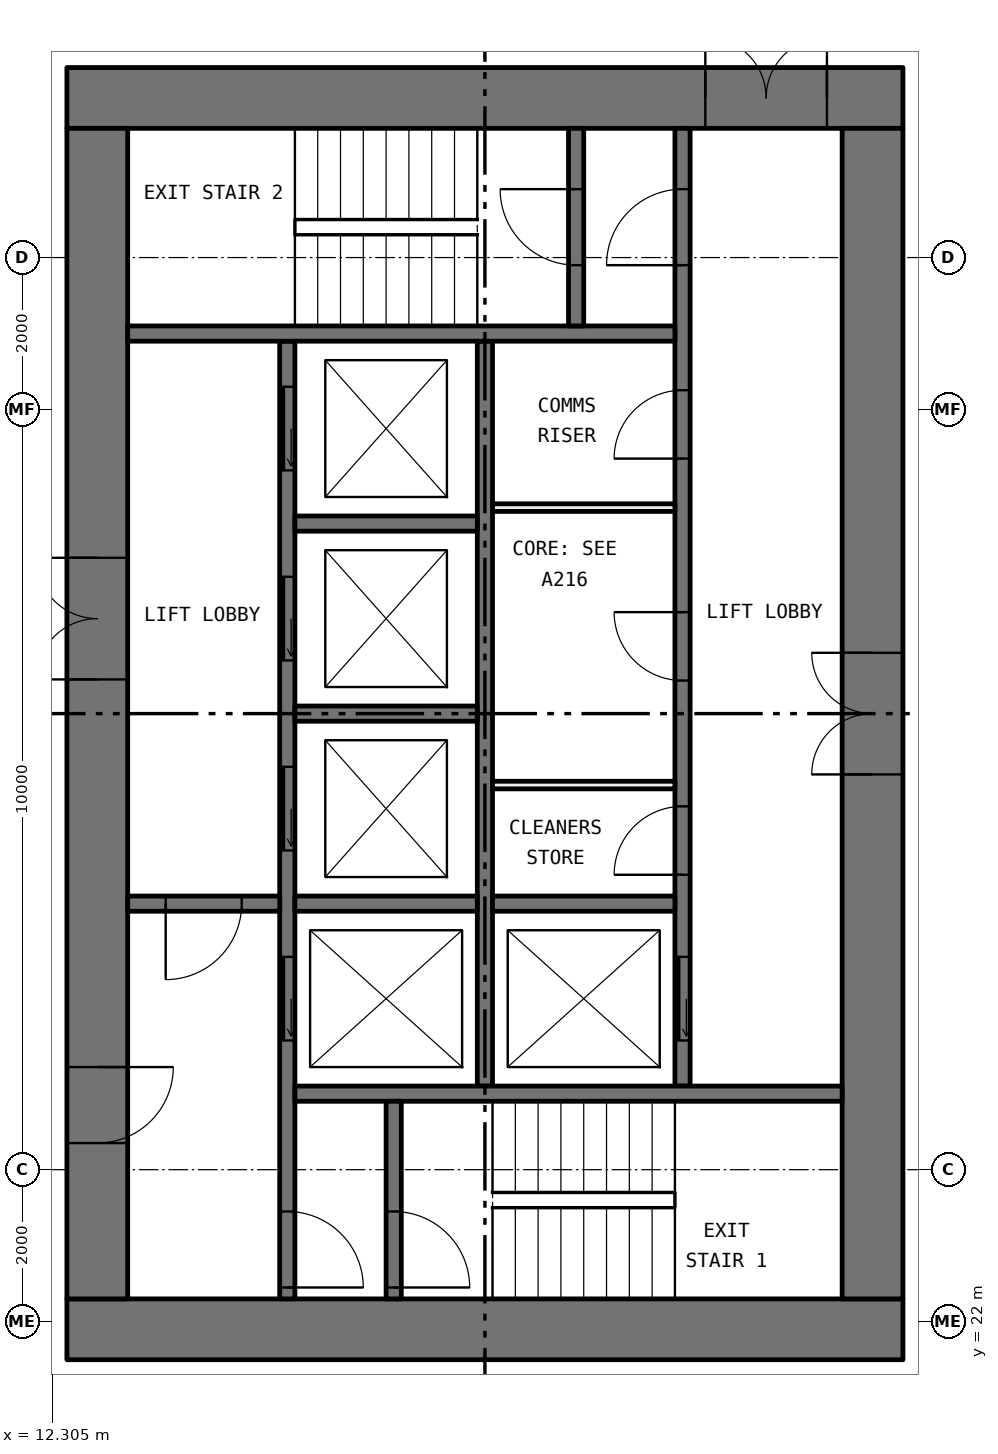
"""IFC4 building model, lengths in metres.
Left out: names, types, materials, properties, quantities, classifications, styles, units other than length and angle.
Written with IfcOpenShell. Run it as: python <this file> out.ifc"""

import sys

from ifc_helpers import new_model, si_unit, direction, frame, frame_2d, origin, place, context, subcontext, project, spatial, rectangle, extrude, element, fill, save


model = new_model("IFC4")
c1 = context("Model", 3, precision=1e-05, world=origin(), true_north=direction((0.0, 1.0)))
c2 = subcontext(c1, "Body", "Model", "MODEL_VIEW")
j1 = project(units=[si_unit("LENGTHUNIT", "METRE"), si_unit("PLANEANGLEUNIT", "RADIAN")], contexts=[c1])
p1 = place(None, origin())
s1 = spatial("IfcSite", under=j1, at=p1, CompositionType="ELEMENT")
p2 = place(p1, origin())
s2 = spatial("IfcBuilding", under=s1, at=p2, CompositionType="ELEMENT")
p3 = place(p2, frame((0.0, 0.0, 64.5)))
s3 = spatial("IfcBuildingStorey", under=s2, at=p3, CompositionType="ELEMENT", Elevation=64.5)
p4 = place(p3, frame((12.5, 21.9, 0.0), z_axis=(0.0, 0.0, 1.0), x_axis=(1.0, 0.0, 0.0)))
e1 = element("IfcWall", 1, at=p4, inside=s3, PredefinedType="SHEAR", context=c2, shape_type="SweptSolid", body=[
    extrude(rectangle(XDim=11.0, YDim=0.8, at=frame_2d((5.5, 0.0))), origin(), (0.0, 0.0, 1.0), 3.05),
])
p5 = place(p3, frame((12.5, 38.1, 0.0), z_axis=(0.0, 0.0, 1.0), x_axis=(1.0, 0.0, 0.0)))
e2 = element("IfcWall", 2, at=p5, inside=s3, PredefinedType="SHEAR", context=c2, shape_type="SweptSolid", body=[
    extrude(rectangle(XDim=11.0, YDim=0.8, at=frame_2d((5.5, 0.0))), origin(), (0.0, 0.0, 1.0), 3.05),
])
p6 = place(p5, frame((8.4, 0.0, 0.0)))
e3 = element("IfcOpeningElement", 3, at=p6, cuts=e2, PredefinedType="OPENING", context=c2, shape_type="SweptSolid", body=[
    extrude(rectangle(XDim=1.6, YDim=2.1, at=frame_2d((0.8, 1.05))), frame((0.0, 0.41, 0.0), z_axis=(0.0, -1.0, 0.0), x_axis=(1.0, 0.0, 0.0)), (0.0, 0.0, 1.0), 0.82),
])
p7 = place(p3, frame((12.9, 22.3, 0.0), z_axis=(0.0, 0.0, 1.0), x_axis=(0.0, 1.0, 0.0)))
e4 = element("IfcWall", 4, at=p7, inside=s3, PredefinedType="SHEAR", context=c2, shape_type="SweptSolid", body=[
    extrude(rectangle(XDim=15.4, YDim=0.8, at=frame_2d((7.7, 0.0))), origin(), (0.0, 0.0, 1.0), 3.05),
])
p8 = place(p7, frame((8.15, 0.0, 0.0)))
e5 = element("IfcOpeningElement", 5, at=p8, cuts=e4, PredefinedType="OPENING", context=c2, shape_type="SweptSolid", body=[
    extrude(rectangle(XDim=1.6, YDim=2.1, at=frame_2d((0.8, 1.05))), frame((0.0, 0.41, 0.0), z_axis=(0.0, -1.0, 0.0), x_axis=(1.0, 0.0, 0.0)), (0.0, 0.0, 1.0), 0.82),
])
p9 = place(p7, frame((2.05, 0.0, 0.0)))
e6 = element("IfcOpeningElement", 6, at=p9, cuts=e4, PredefinedType="OPENING", context=c2, shape_type="SweptSolid", body=[
    extrude(rectangle(XDim=1.0, YDim=2.1, at=frame_2d((0.5, 1.05))), frame((0.0, 0.41, 0.0), z_axis=(0.0, -1.0, 0.0), x_axis=(1.0, 0.0, 0.0)), (0.0, 0.0, 1.0), 0.82),
])
p10 = place(p3, frame((23.1, 22.3, 0.0), z_axis=(0.0, 0.0, 1.0), x_axis=(0.0, 1.0, 0.0)))
e7 = element("IfcWall", 7, at=p10, inside=s3, PredefinedType="SHEAR", context=c2, shape_type="SweptSolid", body=[
    extrude(rectangle(XDim=15.4, YDim=0.8, at=frame_2d((7.7, 0.0))), origin(), (0.0, 0.0, 1.0), 3.05),
])
p11 = place(p10, frame((6.9, 0.0, 0.0)))
e8 = element("IfcOpeningElement", 8, at=p11, cuts=e7, PredefinedType="OPENING", context=c2, shape_type="SweptSolid", body=[
    extrude(rectangle(XDim=1.6, YDim=2.1, at=frame_2d((0.8, 1.05))), frame((0.0, 0.41, 0.0), z_axis=(0.0, -1.0, 0.0), x_axis=(1.0, 0.0, 0.0)), (0.0, 0.0, 1.0), 0.82),
])
p12 = place(p3, frame((15.4, 22.3, 0.0), z_axis=(0.0, 0.0, 1.0), x_axis=(0.0, 1.0, 0.0)))
e9 = element("IfcWall", 9, at=p12, inside=s3, PredefinedType="SOLIDWALL", context=c2, shape_type="SweptSolid", body=[
    extrude(rectangle(XDim=12.6, YDim=0.2, at=frame_2d((6.3, 0.0))), origin(), (0.0, 0.0, 1.0), 3.05),
])
p13 = place(p12, frame((3.4, 0.0, 0.0)))
e10 = element("IfcOpeningElement", 10, at=p13, cuts=e9, PredefinedType="OPENING", context=c2, shape_type="SweptSolid", body=[
    extrude(rectangle(XDim=1.1, YDim=2.1, at=frame_2d((0.55, 1.05))), frame((0.0, 0.11, 0.0), z_axis=(0.0, -1.0, 0.0), x_axis=(1.0, 0.0, 0.0)), (0.0, 0.0, 1.0), 0.22),
])
p14 = place(p12, frame((5.9, 0.0, 0.0)))
e11 = element("IfcOpeningElement", 11, at=p14, cuts=e9, PredefinedType="OPENING", context=c2, shape_type="SweptSolid", body=[
    extrude(rectangle(XDim=1.1, YDim=2.1, at=frame_2d((0.55, 1.05))), frame((0.0, 0.11, 0.0), z_axis=(0.0, -1.0, 0.0), x_axis=(1.0, 0.0, 0.0)), (0.0, 0.0, 1.0), 0.22),
])
p15 = place(p12, frame((8.4, 0.0, 0.0)))
e12 = element("IfcOpeningElement", 12, at=p15, cuts=e9, PredefinedType="OPENING", context=c2, shape_type="SweptSolid", body=[
    extrude(rectangle(XDim=1.1, YDim=2.1, at=frame_2d((0.55, 1.05))), frame((0.0, 0.11, 0.0), z_axis=(0.0, -1.0, 0.0), x_axis=(1.0, 0.0, 0.0)), (0.0, 0.0, 1.0), 0.22),
])
p16 = place(p12, frame((10.9, 0.0, 0.0)))
e13 = element("IfcOpeningElement", 13, at=p16, cuts=e9, PredefinedType="OPENING", context=c2, shape_type="SweptSolid", body=[
    extrude(rectangle(XDim=1.1, YDim=2.1, at=frame_2d((0.55, 1.05))), frame((0.0, 0.11, 0.0), z_axis=(0.0, -1.0, 0.0), x_axis=(1.0, 0.0, 0.0)), (0.0, 0.0, 1.0), 0.22),
])
p17 = place(p12, frame((0.15, 0.0, 0.0)))
e14 = element("IfcOpeningElement", 14, at=p17, cuts=e9, PredefinedType="OPENING", context=c2, shape_type="SweptSolid", body=[
    extrude(rectangle(XDim=1.0, YDim=2.1, at=frame_2d((0.5, 1.05))), frame((0.0, 0.11, 0.0), z_axis=(0.0, -1.0, 0.0), x_axis=(1.0, 0.0, 0.0)), (0.0, 0.0, 1.0), 0.22),
])
p18 = place(p3, frame((20.6, 25.1, 0.0), z_axis=(0.0, 0.0, 1.0), x_axis=(0.0, 1.0, 0.0)))
e15 = element("IfcWall", 15, at=p18, inside=s3, PredefinedType="SOLIDWALL", context=c2, shape_type="SweptSolid", body=[
    extrude(rectangle(XDim=12.6, YDim=0.2, at=frame_2d((6.3, 0.0))), origin(), (0.0, 0.0, 1.0), 3.05),
])
p19 = place(p18, frame((0.6, 0.0, 0.0)))
e16 = element("IfcOpeningElement", 16, at=p19, cuts=e15, PredefinedType="OPENING", context=c2, shape_type="SweptSolid", body=[
    extrude(rectangle(XDim=1.1, YDim=2.1, at=frame_2d((0.55, 1.05))), frame((0.0, 0.11, 0.0), z_axis=(0.0, -1.0, 0.0), x_axis=(1.0, 0.0, 0.0)), (0.0, 0.0, 1.0), 0.22),
])
p20 = place(p18, frame((10.8, 0.0, 0.0)))
e17 = element("IfcOpeningElement", 17, at=p20, cuts=e15, PredefinedType="OPENING", context=c2, shape_type="SweptSolid", body=[
    extrude(rectangle(XDim=1.0, YDim=2.1, at=frame_2d((0.5, 1.05))), frame((0.0, 0.11, 0.0), z_axis=(0.0, -1.0, 0.0), x_axis=(1.0, 0.0, 0.0)), (0.0, 0.0, 1.0), 0.22),
])
p21 = place(p18, frame((2.78, 0.0, 0.0)))
e18 = element("IfcOpeningElement", 18, at=p21, cuts=e15, PredefinedType="OPENING", context=c2, shape_type="SweptSolid", body=[
    extrude(rectangle(XDim=0.9, YDim=2.1, at=frame_2d((0.45, 1.05))), frame((0.0, 0.11, 0.0), z_axis=(0.0, -1.0, 0.0), x_axis=(1.0, 0.0, 0.0)), (0.0, 0.0, 1.0), 0.22),
])
p22 = place(p18, frame((5.335, 0.0, 0.0)))
e19 = element("IfcOpeningElement", 19, at=p22, cuts=e15, PredefinedType="OPENING", context=c2, shape_type="SweptSolid", body=[
    extrude(rectangle(XDim=0.9, YDim=2.1, at=frame_2d((0.45, 1.05))), frame((0.0, 0.11, 0.0), z_axis=(0.0, -1.0, 0.0), x_axis=(1.0, 0.0, 0.0)), (0.0, 0.0, 1.0), 0.22),
])
p23 = place(p18, frame((8.255, 0.0, 0.0)))
e20 = element("IfcOpeningElement", 20, at=p23, cuts=e15, PredefinedType="OPENING", context=c2, shape_type="SweptSolid", body=[
    extrude(rectangle(XDim=0.9, YDim=2.1, at=frame_2d((0.45, 1.05))), frame((0.0, 0.11, 0.0), z_axis=(0.0, -1.0, 0.0), x_axis=(1.0, 0.0, 0.0)), (0.0, 0.0, 1.0), 0.22),
])
p24 = place(p3, frame((18.0, 25.1, 0.0), z_axis=(0.0, 0.0, 1.0), x_axis=(0.0, 1.0, 0.0)))
e21 = element("IfcWall", 21, at=p24, inside=s3, PredefinedType="SOLIDWALL", context=c2, shape_type="SweptSolid", body=[
    extrude(rectangle(XDim=9.8, YDim=0.2, at=frame_2d((4.9, 0.0))), origin(), (0.0, 0.0, 1.0), 3.05),
])
for number, where, z_axis, x_axis in (
    (22, (15.5, 25.0, 0.0), (0.0, 0.0, 1.0), (1.0, 0.0, 0.0)),
    (23, (13.3, 35.0, 0.0), (0.0, 0.0, 1.0), (1.0, 0.0, 0.0)),
):
    element("IfcWall", number, at=place(p3, frame(where, z_axis=z_axis, x_axis=x_axis)), inside=s3, PredefinedType="SOLIDWALL", context=c2, shape_type="SweptSolid", body=[
        extrude(rectangle(XDim=7.2, YDim=0.2, at=frame_2d((3.6, 0.0))), origin(), (0.0, 0.0, 1.0), 3.05),
    ])
p25 = place(p3, frame((13.3, 27.5, 0.0), z_axis=(0.0, 0.0, 1.0), x_axis=(1.0, 0.0, 0.0)))
e24 = element("IfcWall", 24, at=p25, inside=s3, PredefinedType="SOLIDWALL", context=c2, shape_type="SweptSolid", body=[
    extrude(rectangle(XDim=2.0, YDim=0.2, at=frame_2d((1.0, 0.0))), origin(), (0.0, 0.0, 1.0), 3.05),
])
p26 = place(p25, frame((0.5, 0.0, 0.0)))
e25 = element("IfcOpeningElement", 25, at=p26, cuts=e24, PredefinedType="OPENING", context=c2, shape_type="SweptSolid", body=[
    extrude(rectangle(XDim=1.0, YDim=2.1, at=frame_2d((0.5, 1.05))), frame((0.0, 0.11, 0.0), z_axis=(0.0, -1.0, 0.0), x_axis=(1.0, 0.0, 0.0)), (0.0, 0.0, 1.0), 0.22),
])
p27 = place(p3, frame((16.8, 22.3, 0.0), z_axis=(0.0, 0.0, 1.0), x_axis=(0.0, 1.0, 0.0)))
e26 = element("IfcWall", 26, at=p27, inside=s3, PredefinedType="SOLIDWALL", context=c2, shape_type="SweptSolid", body=[
    extrude(rectangle(XDim=2.6, YDim=0.2, at=frame_2d((1.3, 0.0))), origin(), (0.0, 0.0, 1.0), 3.05),
])
p28 = place(p27, frame((0.15, 0.0, 0.0)))
e27 = element("IfcOpeningElement", 27, at=p28, cuts=e26, PredefinedType="OPENING", context=c2, shape_type="SweptSolid", body=[
    extrude(rectangle(XDim=1.0, YDim=2.1, at=frame_2d((0.5, 1.05))), frame((0.0, 0.11, 0.0), z_axis=(0.0, -1.0, 0.0), x_axis=(1.0, 0.0, 0.0)), (0.0, 0.0, 1.0), 0.22),
])
p29 = place(p3, frame((19.2, 35.1, 0.0), z_axis=(0.0, 0.0, 1.0), x_axis=(0.0, 1.0, 0.0)))
e28 = element("IfcWall", 28, at=p29, inside=s3, PredefinedType="SOLIDWALL", context=c2, shape_type="SweptSolid", body=[
    extrude(rectangle(XDim=2.6, YDim=0.2, at=frame_2d((1.3, 0.0))), origin(), (0.0, 0.0, 1.0), 3.05),
])
p30 = place(p29, frame((0.8, 0.0, 0.0)))
e29 = element("IfcOpeningElement", 29, at=p30, cuts=e28, PredefinedType="OPENING", context=c2, shape_type="SweptSolid", body=[
    extrude(rectangle(XDim=1.0, YDim=2.1, at=frame_2d((0.5, 1.05))), frame((0.0, 0.11, 0.0), z_axis=(0.0, -1.0, 0.0), x_axis=(1.0, 0.0, 0.0)), (0.0, 0.0, 1.0), 0.22),
])
for number, where, z_axis, x_axis in (
    (30, (15.5, 27.5, 0.0), (0.0, 0.0, 1.0), (1.0, 0.0, 0.0)),
    (31, (15.5, 30.0, 0.0), (0.0, 0.0, 1.0), (1.0, 0.0, 0.0)),
    (32, (15.5, 32.5, 0.0), (0.0, 0.0, 1.0), (1.0, 0.0, 0.0)),
    (33, (18.1, 27.5, 0.0), (0.0, 0.0, 1.0), (1.0, 0.0, 0.0)),
):
    element("IfcWall", number, at=place(p3, frame(where, z_axis=z_axis, x_axis=x_axis)), inside=s3, PredefinedType="SOLIDWALL", context=c2, shape_type="SweptSolid", body=[
        extrude(rectangle(XDim=2.4, YDim=0.2, at=frame_2d((1.2, 0.0))), origin(), (0.0, 0.0, 1.0), 3.05),
    ])
for number, where, z_axis, x_axis in (
    (34, (18.1, 29.06, 0.0), (0.0, 0.0, 1.0), (1.0, 0.0, 0.0)),
    (35, (18.1, 32.71, 0.0), (0.0, 0.0, 1.0), (1.0, 0.0, 0.0)),
):
    element("IfcWall", number, at=place(p3, frame(where, z_axis=z_axis, x_axis=x_axis)), inside=s3, PredefinedType="PARTITIONING", context=c2, shape_type="SweptSolid", body=[
        extrude(rectangle(XDim=2.4, YDim=0.1, at=frame_2d((1.2, 0.0))), origin(), (0.0, 0.0, 1.0), 3.05),
    ])
p31 = place(p19, origin())
e36 = element("IfcDoor", 36, at=p31, inside=s3, OperationType="SLIDING_TO_LEFT", PredefinedType="DOOR", context=c2, shape_type="SweptSolid", body=[
    extrude(rectangle(XDim=1.1, YDim=2.1, at=frame_2d((0.55, 1.05))), frame((0.0, 0.025, 0.0), z_axis=(0.0, -1.0, 0.0), x_axis=(1.0, 0.0, 0.0)), (0.0, 0.0, 1.0), 0.05),
])
fill(e16, e36)
p32 = place(p13, origin())
e37 = element("IfcDoor", 37, at=p32, inside=s3, OperationType="SLIDING_TO_LEFT", PredefinedType="DOOR", context=c2, shape_type="SweptSolid", body=[
    extrude(rectangle(XDim=1.1, YDim=2.1, at=frame_2d((0.55, 1.05))), frame((0.0, 0.025, 0.0), z_axis=(0.0, -1.0, 0.0), x_axis=(1.0, 0.0, 0.0)), (0.0, 0.0, 1.0), 0.05),
])
fill(e10, e37)
p33 = place(p14, origin())
e38 = element("IfcDoor", 38, at=p33, inside=s3, OperationType="SLIDING_TO_LEFT", PredefinedType="DOOR", context=c2, shape_type="SweptSolid", body=[
    extrude(rectangle(XDim=1.1, YDim=2.1, at=frame_2d((0.55, 1.05))), frame((0.0, 0.025, 0.0), z_axis=(0.0, -1.0, 0.0), x_axis=(1.0, 0.0, 0.0)), (0.0, 0.0, 1.0), 0.05),
])
fill(e11, e38)
p34 = place(p15, origin())
e39 = element("IfcDoor", 39, at=p34, inside=s3, OperationType="SLIDING_TO_LEFT", PredefinedType="DOOR", context=c2, shape_type="SweptSolid", body=[
    extrude(rectangle(XDim=1.1, YDim=2.1, at=frame_2d((0.55, 1.05))), frame((0.0, 0.025, 0.0), z_axis=(0.0, -1.0, 0.0), x_axis=(1.0, 0.0, 0.0)), (0.0, 0.0, 1.0), 0.05),
])
fill(e12, e39)
p35 = place(p16, origin())
e40 = element("IfcDoor", 40, at=p35, inside=s3, OperationType="SLIDING_TO_LEFT", PredefinedType="DOOR", context=c2, shape_type="SweptSolid", body=[
    extrude(rectangle(XDim=1.1, YDim=2.1, at=frame_2d((0.55, 1.05))), frame((0.0, 0.025, 0.0), z_axis=(0.0, -1.0, 0.0), x_axis=(1.0, 0.0, 0.0)), (0.0, 0.0, 1.0), 0.05),
])
fill(e13, e40)
p36 = place(p28, frame((1.0, 0.0, 0.0), x_axis=(-1.0, 0.0, 0.0)))
e41 = element("IfcDoor", 41, at=p36, inside=s3, OperationType="SINGLE_SWING_LEFT", PredefinedType="DOOR", context=c2, shape_type="SweptSolid", body=[
    extrude(rectangle(XDim=1.0, YDim=2.1, at=frame_2d((0.5, 1.05))), frame((0.0, 0.025, 0.0), z_axis=(0.0, -1.0, 0.0), x_axis=(1.0, 0.0, 0.0)), (0.0, 0.0, 1.0), 0.05),
])
fill(e27, e41)
p37 = place(p17, frame((1.0, 0.0, 0.0), x_axis=(-1.0, 0.0, 0.0)))
e42 = element("IfcDoor", 42, at=p37, inside=s3, OperationType="SINGLE_SWING_LEFT", PredefinedType="DOOR", context=c2, shape_type="SweptSolid", body=[
    extrude(rectangle(XDim=1.0, YDim=2.1, at=frame_2d((0.5, 1.05))), frame((0.0, 0.025, 0.0), z_axis=(0.0, -1.0, 0.0), x_axis=(1.0, 0.0, 0.0)), (0.0, 0.0, 1.0), 0.05),
])
fill(e14, e42)
p38 = place(p20, origin())
e43 = element("IfcDoor", 43, at=p38, inside=s3, OperationType="SINGLE_SWING_RIGHT", PredefinedType="DOOR", context=c2, shape_type="SweptSolid", body=[
    extrude(rectangle(XDim=1.0, YDim=2.1, at=frame_2d((0.5, 1.05))), frame((0.0, 0.025, 0.0), z_axis=(0.0, -1.0, 0.0), x_axis=(1.0, 0.0, 0.0)), (0.0, 0.0, 1.0), 0.05),
])
fill(e17, e43)
p39 = place(p30, origin())
e44 = element("IfcDoor", 44, at=p39, inside=s3, OperationType="SINGLE_SWING_LEFT", PredefinedType="DOOR", context=c2, shape_type="SweptSolid", body=[
    extrude(rectangle(XDim=1.0, YDim=2.1, at=frame_2d((0.5, 1.05))), frame((0.0, 0.025, 0.0), z_axis=(0.0, -1.0, 0.0), x_axis=(1.0, 0.0, 0.0)), (0.0, 0.0, 1.0), 0.05),
])
fill(e29, e44)
p40 = place(p26, frame((1.0, 0.0, 0.0), x_axis=(-1.0, 0.0, 0.0)))
e45 = element("IfcDoor", 45, at=p40, inside=s3, OperationType="SINGLE_SWING_LEFT", PredefinedType="DOOR", context=c2, shape_type="SweptSolid", body=[
    extrude(rectangle(XDim=1.0, YDim=2.1, at=frame_2d((0.5, 1.05))), frame((0.0, 0.025, 0.0), z_axis=(0.0, -1.0, 0.0), x_axis=(1.0, 0.0, 0.0)), (0.0, 0.0, 1.0), 0.05),
])
fill(e25, e45)
p41 = place(p8, origin())
e46 = element("IfcDoor", 46, at=p41, inside=s3, OperationType="DOUBLE_DOOR_SINGLE_SWING", PredefinedType="DOOR", context=c2, shape_type="SweptSolid", body=[
    extrude(rectangle(XDim=1.6, YDim=2.1, at=frame_2d((0.8, 1.05))), frame((0.0, 0.025, 0.0), z_axis=(0.0, -1.0, 0.0), x_axis=(1.0, 0.0, 0.0)), (0.0, 0.0, 1.0), 0.05),
])
fill(e5, e46)
p42 = place(p9, frame((1.0, 0.0, 0.0), x_axis=(-1.0, 0.0, 0.0)))
e47 = element("IfcDoor", 47, at=p42, inside=s3, OperationType="SINGLE_SWING_RIGHT", PredefinedType="DOOR", context=c2, shape_type="SweptSolid", body=[
    extrude(rectangle(XDim=1.0, YDim=2.1, at=frame_2d((0.5, 1.05))), frame((0.0, 0.025, 0.0), z_axis=(0.0, -1.0, 0.0), x_axis=(1.0, 0.0, 0.0)), (0.0, 0.0, 1.0), 0.05),
])
fill(e6, e47)
p43 = place(p6, origin())
e48 = element("IfcDoor", 48, at=p43, inside=s3, OperationType="DOUBLE_DOOR_SINGLE_SWING", PredefinedType="DOOR", context=c2, shape_type="SweptSolid", body=[
    extrude(rectangle(XDim=1.6, YDim=2.1, at=frame_2d((0.8, 1.05))), frame((0.0, 0.025, 0.0), z_axis=(0.0, -1.0, 0.0), x_axis=(1.0, 0.0, 0.0)), (0.0, 0.0, 1.0), 0.05),
])
fill(e3, e48)
p44 = place(p11, origin())
e49 = element("IfcDoor", 49, at=p44, inside=s3, OperationType="DOUBLE_DOOR_SINGLE_SWING", PredefinedType="DOOR", context=c2, shape_type="SweptSolid", body=[
    extrude(rectangle(XDim=1.6, YDim=2.1, at=frame_2d((0.8, 1.05))), frame((0.0, 0.025, 0.0), z_axis=(0.0, -1.0, 0.0), x_axis=(1.0, 0.0, 0.0)), (0.0, 0.0, 1.0), 0.05),
])
fill(e8, e49)
p45 = place(p21, origin())
e50 = element("IfcDoor", 50, at=p45, inside=s3, OperationType="SINGLE_SWING_RIGHT", PredefinedType="DOOR", context=c2, shape_type="SweptSolid", body=[
    extrude(rectangle(XDim=0.9, YDim=2.1, at=frame_2d((0.45, 1.05))), frame((0.0, 0.025, 0.0), z_axis=(0.0, -1.0, 0.0), x_axis=(1.0, 0.0, 0.0)), (0.0, 0.0, 1.0), 0.05),
])
fill(e18, e50)
p46 = place(p22, origin())
e51 = element("IfcDoor", 51, at=p46, inside=s3, OperationType="SINGLE_SWING_LEFT", PredefinedType="DOOR", context=c2, shape_type="SweptSolid", body=[
    extrude(rectangle(XDim=0.9, YDim=2.1, at=frame_2d((0.45, 1.05))), frame((0.0, 0.025, 0.0), z_axis=(0.0, -1.0, 0.0), x_axis=(1.0, 0.0, 0.0)), (0.0, 0.0, 1.0), 0.05),
])
fill(e19, e51)
p47 = place(p23, origin())
e52 = element("IfcDoor", 52, at=p47, inside=s3, OperationType="SINGLE_SWING_RIGHT", PredefinedType="DOOR", context=c2, shape_type="SweptSolid", body=[
    extrude(rectangle(XDim=0.9, YDim=2.1, at=frame_2d((0.45, 1.05))), frame((0.0, 0.025, 0.0), z_axis=(0.0, -1.0, 0.0), x_axis=(1.0, 0.0, 0.0)), (0.0, 0.0, 1.0), 0.05),
])
fill(e20, e52)
save(model, sys.argv[1])
